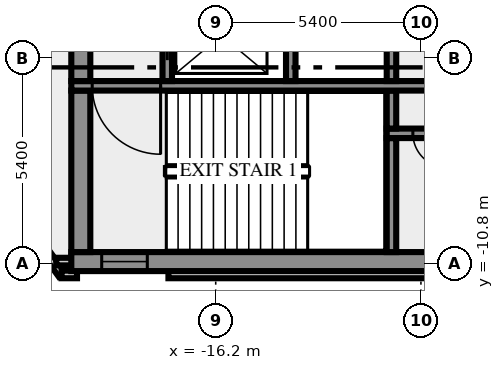
"""IFC4 building model, lengths in metres.
Left out: names, types, materials, properties, quantities, classifications, styles, units other than length and angle.
Written with IfcOpenShell. Run it as: python <this file> out.ifc"""

import sys

from ifc_helpers import new_model, si_unit, direction, frame, frame_2d, origin, place, context, subcontext, project, spatial, rectangle, extrude, element, fill, save


model = new_model("IFC4")
c1 = context("Model", 3, precision=1e-05, world=origin(), true_north=direction((0.0, 1.0)))
c2 = subcontext(c1, "Body", "Model", "MODEL_VIEW")
j1 = project(units=[si_unit("LENGTHUNIT", "METRE"), si_unit("PLANEANGLEUNIT", "RADIAN")], contexts=[c1])
p1 = place(None, origin())
s1 = spatial("IfcSite", under=j1, at=p1, CompositionType="ELEMENT")
p2 = place(p1, origin())
s2 = spatial("IfcBuilding", under=s1, at=p2, CompositionType="ELEMENT")
p3 = place(p2, frame((0.0, 0.0, 148.0)))
s3 = spatial("IfcBuildingStorey", under=s2, at=p3, CompositionType="ELEMENT", Elevation=148.0)
p4 = place(p3, frame((-21.833, -8.909, 0.0), z_axis=(0.0, 0.0, 1.0), x_axis=(0.587766567315, -0.809030569476, 0.0)))
e1 = element("IfcWall", 1, at=p4, inside=s3, PredefinedType="SOLIDWALL", context=c2, shape_type="SweptSolid", body=[
    extrude(rectangle(XDim=2.688, YDim=0.2, at=frame_2d((1.344, 0.0))), origin(), (0.0, 0.0, 1.0), 3.65),
])
p5 = place(p3, frame((-20.256, -11.088, 0.0), z_axis=(0.0, 0.0, 1.0), x_axis=(1.0, 0.0, 0.0)))
e2 = element("IfcWall", 2, at=p5, inside=s3, PredefinedType="SOLIDWALL", context=c2, shape_type="SweptSolid", body=[
    extrude(rectangle(XDim=0.406, YDim=0.2, at=frame_2d((0.203, 0.0))), origin(), (0.0, 0.0, 1.0), 3.65),
])
p6 = place(p3, frame((-17.444, -11.088, 0.0), z_axis=(0.0, 0.0, 1.0), x_axis=(1.0, 0.0, 0.0)))
e3 = element("IfcWall", 3, at=p6, inside=s3, PredefinedType="SOLIDWALL", context=c2, shape_type="SweptSolid", body=[
    extrude(rectangle(XDim=34.888, YDim=0.2, at=frame_2d((17.444, 0.0))), origin(), (0.0, 0.0, 1.0), 3.65),
])
p7 = place(p3, frame((-19.98, -10.75, 0.0), z_axis=(0.0, 0.0, 1.0), x_axis=(-1.0, 0.0, 0.0)))
e4 = element("IfcWall", 4, at=p7, inside=s3, PredefinedType="SOLIDWALL", context=c2, shape_type="SweptSolid", body=[
    extrude(rectangle(XDim=0.417, YDim=0.2, at=frame_2d((0.208, 0.0))), origin(), (0.0, 0.0, 1.0), 3.65),
])
p8 = place(p3, frame((-20.0, -10.75, 0.0), z_axis=(0.0, 0.0, 1.0), x_axis=(1.0, 0.0, 0.0)))
e5 = element("IfcWall", 5, at=p8, inside=s3, PredefinedType="SHEAR", context=c2, shape_type="SweptSolid", body=[
    extrude(rectangle(XDim=40.0, YDim=0.5, at=frame_2d((20.0, 0.0))), origin(), (0.0, 0.0, 1.0), 3.65),
])
p9 = place(p8, frame((0.8, 0.0, 1.0)))
e6 = element("IfcOpeningElement", 6, at=p9, cuts=e5, PredefinedType="OPENING", context=c2, shape_type="SweptSolid", body=[
    extrude(rectangle(XDim=1.2, YDim=1.2, at=frame_2d((0.6, 0.6))), frame((0.0, 0.26, 0.0), z_axis=(0.0, -1.0, 0.0), x_axis=(1.0, 0.0, 0.0)), (0.0, 0.0, 1.0), 0.52),
])
p10 = place(p8, frame((38.0, 0.0, 1.0)))
e7 = element("IfcOpeningElement", 7, at=p10, cuts=e5, PredefinedType="OPENING", context=c2, shape_type="SweptSolid", body=[
    extrude(rectangle(XDim=1.2, YDim=1.2, at=frame_2d((0.6, 0.6))), frame((0.0, 0.26, 0.0), z_axis=(0.0, -1.0, 0.0), x_axis=(1.0, 0.0, 0.0)), (0.0, 0.0, 1.0), 0.52),
])
p11 = place(p3, frame((-19.75, -10.5, 0.0), z_axis=(0.0, 0.0, 1.0), x_axis=(0.0, 1.0, 0.0)))
e8 = element("IfcWall", 8, at=p11, inside=s3, PredefinedType="SHEAR", context=c2, shape_type="SweptSolid", body=[
    extrude(rectangle(XDim=4.25, YDim=0.5, at=frame_2d((2.125, 0.0))), origin(), (0.0, 0.0, 1.0), 3.65),
])
p12 = place(p3, frame((-11.575, -10.5, 0.0), z_axis=(0.0, 0.0, 1.0), x_axis=(0.0, 1.0, 0.0)))
e9 = element("IfcWall", 9, at=p12, inside=s3, PredefinedType="SHEAR", context=c2, shape_type="SweptSolid", body=[
    extrude(rectangle(XDim=3.0, YDim=0.25, at=frame_2d((1.5, 0.0))), origin(), (0.0, 0.0, 1.0), 3.65),
])
p13 = place(p3, frame((11.7, -7.375, 0.0), z_axis=(0.0, 0.0, 1.0), x_axis=(-1.0, 0.0, 0.0)))
e10 = element("IfcWall", 10, at=p13, inside=s3, PredefinedType="SHEAR", context=c2, shape_type="SweptSolid", body=[
    extrude(rectangle(XDim=23.4, YDim=0.25, at=frame_2d((11.7, 0.0))), origin(), (0.0, 0.0, 1.0), 3.65),
])
p14 = place(p13, frame((21.812, 0.0, 0.0)))
e11 = element("IfcOpeningElement", 11, at=p14, cuts=e10, PredefinedType="OPENING", context=c2, shape_type="SweptSolid", body=[
    extrude(rectangle(XDim=0.9, YDim=2.1, at=frame_2d((0.45, 1.05))), frame((0.0, 0.135, 0.0), z_axis=(0.0, -1.0, 0.0), x_axis=(1.0, 0.0, 0.0)), (0.0, 0.0, 1.0), 0.27),
])
p15 = place(p13, frame((19.55, 0.0, 0.0)))
e12 = element("IfcOpeningElement", 12, at=p15, cuts=e10, PredefinedType="OPENING", context=c2, shape_type="SweptSolid", body=[
    extrude(rectangle(XDim=0.9, YDim=2.1, at=frame_2d((0.45, 1.05))), frame((0.0, 0.135, 0.0), z_axis=(0.0, -1.0, 0.0), x_axis=(1.0, 0.0, 0.0)), (0.0, 0.0, 1.0), 0.27),
])
p16 = place(p13, frame((16.787, 0.0, 0.0)))
e13 = element("IfcOpeningElement", 13, at=p16, cuts=e10, PredefinedType="OPENING", context=c2, shape_type="SweptSolid", body=[
    extrude(rectangle(XDim=0.9, YDim=2.1, at=frame_2d((0.45, 1.05))), frame((0.0, 0.135, 0.0), z_axis=(0.0, -1.0, 0.0), x_axis=(1.0, 0.0, 0.0)), (0.0, 0.0, 1.0), 0.27),
])
p17 = place(p13, frame((14.55, 0.0, 0.0)))
e14 = element("IfcOpeningElement", 14, at=p17, cuts=e10, PredefinedType="OPENING", context=c2, shape_type="SweptSolid", body=[
    extrude(rectangle(XDim=0.8, YDim=2.1, at=frame_2d((0.4, 1.05))), frame((0.0, 0.135, 0.0), z_axis=(0.0, -1.0, 0.0), x_axis=(1.0, 0.0, 0.0)), (0.0, 0.0, 1.0), 0.27),
])
p18 = place(p13, frame((12.8, 0.0, 0.0)))
e15 = element("IfcOpeningElement", 15, at=p18, cuts=e10, PredefinedType="OPENING", context=c2, shape_type="SweptSolid", body=[
    extrude(rectangle(XDim=0.9, YDim=2.1, at=frame_2d((0.45, 1.05))), frame((0.0, 0.135, 0.0), z_axis=(0.0, -1.0, 0.0), x_axis=(1.0, 0.0, 0.0)), (0.0, 0.0, 1.0), 0.27),
])
p19 = place(p13, frame((10.7, 0.0, 0.0)))
e16 = element("IfcOpeningElement", 16, at=p19, cuts=e10, PredefinedType="OPENING", context=c2, shape_type="SweptSolid", body=[
    extrude(rectangle(XDim=0.9, YDim=2.1, at=frame_2d((0.45, 1.05))), frame((0.0, 0.135, 0.0), z_axis=(0.0, -1.0, 0.0), x_axis=(1.0, 0.0, 0.0)), (0.0, 0.0, 1.0), 0.27),
])
p20 = place(p13, frame((8.35, 0.0, 0.0)))
e17 = element("IfcOpeningElement", 17, at=p20, cuts=e10, PredefinedType="OPENING", context=c2, shape_type="SweptSolid", body=[
    extrude(rectangle(XDim=1.1, YDim=2.1, at=frame_2d((0.55, 1.05))), frame((0.0, 0.135, 0.0), z_axis=(0.0, -1.0, 0.0), x_axis=(1.0, 0.0, 0.0)), (0.0, 0.0, 1.0), 0.27),
])
p21 = place(p13, frame((5.85, 0.0, 0.0)))
e18 = element("IfcOpeningElement", 18, at=p21, cuts=e10, PredefinedType="OPENING", context=c2, shape_type="SweptSolid", body=[
    extrude(rectangle(XDim=1.1, YDim=2.1, at=frame_2d((0.55, 1.05))), frame((0.0, 0.135, 0.0), z_axis=(0.0, -1.0, 0.0), x_axis=(1.0, 0.0, 0.0)), (0.0, 0.0, 1.0), 0.27),
])
p22 = place(p13, frame((3.35, 0.0, 0.0)))
e19 = element("IfcOpeningElement", 19, at=p22, cuts=e10, PredefinedType="OPENING", context=c2, shape_type="SweptSolid", body=[
    extrude(rectangle(XDim=1.1, YDim=2.1, at=frame_2d((0.55, 1.05))), frame((0.0, 0.135, 0.0), z_axis=(0.0, -1.0, 0.0), x_axis=(1.0, 0.0, 0.0)), (0.0, 0.0, 1.0), 0.27),
])
p23 = place(p13, frame((0.85, 0.0, 0.0)))
e20 = element("IfcOpeningElement", 20, at=p23, cuts=e10, PredefinedType="OPENING", context=c2, shape_type="SweptSolid", body=[
    extrude(rectangle(XDim=1.1, YDim=2.1, at=frame_2d((0.55, 1.05))), frame((0.0, 0.135, 0.0), z_axis=(0.0, -1.0, 0.0), x_axis=(1.0, 0.0, 0.0)), (0.0, 0.0, 1.0), 0.27),
])
p24 = place(p3, frame((-11.575, -7.25, 0.0), z_axis=(0.0, 0.0, 1.0), x_axis=(0.0, 1.0, 0.0)))
e21 = element("IfcWall", 21, at=p24, inside=s3, PredefinedType="SHEAR", context=c2, shape_type="SweptSolid", body=[
    extrude(rectangle(XDim=1.0, YDim=0.25, at=frame_2d((0.5, 0.0))), origin(), (0.0, 0.0, 1.0), 3.65),
])
p25 = place(p3, frame((-9.8, -6.125, 0.0), z_axis=(0.0, 0.0, 1.0), x_axis=(-1.0, 0.0, 0.0)))
e22 = element("IfcWall", 22, at=p25, inside=s3, PredefinedType="SHEAR", context=c2, shape_type="SweptSolid", body=[
    extrude(rectangle(XDim=10.2, YDim=0.25, at=frame_2d((5.1, 0.0))), origin(), (0.0, 0.0, 1.0), 3.65),
])
p26 = place(p25, frame((7.85, 0.0, 0.0)))
e23 = element("IfcOpeningElement", 23, at=p26, cuts=e22, PredefinedType="OPENING", context=c2, shape_type="SweptSolid", body=[
    extrude(rectangle(XDim=1.8, YDim=2.1, at=frame_2d((0.9, 1.05))), frame((0.0, 0.135, 0.0), z_axis=(0.0, -1.0, 0.0), x_axis=(1.0, 0.0, 0.0)), (0.0, 0.0, 1.0), 0.27),
])
p27 = place(p3, frame((-19.75, -6.0, 0.0), z_axis=(0.0, 0.0, 1.0), x_axis=(0.0, 1.0, 0.0)))
e24 = element("IfcWall", 24, at=p27, inside=s3, PredefinedType="SHEAR", context=c2, shape_type="SweptSolid", body=[
    extrude(rectangle(XDim=4.3, YDim=0.5, at=frame_2d((2.15, 0.0))), origin(), (0.0, 0.0, 1.0), 3.65),
])
p28 = place(p3, frame((-17.475, -6.0, 0.0), z_axis=(0.0, 0.0, 1.0), x_axis=(0.0, 1.0, 0.0)))
e25 = element("IfcWall", 25, at=p28, inside=s3, PredefinedType="SHEAR", context=c2, shape_type="SweptSolid", body=[
    extrude(rectangle(XDim=4.3, YDim=0.25, at=frame_2d((2.15, 0.0))), origin(), (0.0, 0.0, 1.0), 3.65),
])
p29 = place(p28, frame((0.55, 0.0, 0.0)))
e26 = element("IfcOpeningElement", 26, at=p29, cuts=e25, PredefinedType="OPENING", context=c2, shape_type="SweptSolid", body=[
    extrude(rectangle(XDim=1.3, YDim=2.1, at=frame_2d((0.65, 1.05))), frame((0.0, 0.135, 0.0), z_axis=(0.0, -1.0, 0.0), x_axis=(1.0, 0.0, 0.0)), (0.0, 0.0, 1.0), 0.27),
])
p30 = place(p3, frame((-14.225, -6.0, 0.0), z_axis=(0.0, 0.0, 1.0), x_axis=(0.0, 1.0, 0.0)))
e27 = element("IfcWall", 27, at=p30, inside=s3, PredefinedType="SHEAR", context=c2, shape_type="SweptSolid", body=[
    extrude(rectangle(XDim=4.3, YDim=0.25, at=frame_2d((2.15, 0.0))), origin(), (0.0, 0.0, 1.0), 3.65),
])
p31 = place(p3, frame((-11.575, -6.0, 0.0), z_axis=(0.0, 0.0, 1.0), x_axis=(0.0, 1.0, 0.0)))
e28 = element("IfcWall", 28, at=p31, inside=s3, PredefinedType="SHEAR", context=c2, shape_type="SweptSolid", body=[
    extrude(rectangle(XDim=1.75, YDim=0.25, at=frame_2d((0.875, 0.0))), origin(), (0.0, 0.0, 1.0), 3.65),
])
p32 = place(p9, origin())
e29 = element("IfcWindow", 29, at=p32, inside=s3, PartitioningType="SINGLE_PANEL", PredefinedType="WINDOW", context=c2, shape_type="SweptSolid", body=[
    extrude(rectangle(XDim=1.2, YDim=1.2, at=frame_2d((0.6, 0.6))), frame((0.0, 0.03, 0.0), z_axis=(0.0, -1.0, 0.0), x_axis=(1.0, 0.0, 0.0)), (0.0, 0.0, 1.0), 0.06),
])
fill(e6, e29)
p33 = place(p14, origin())
e30 = element("IfcDoor", 30, at=p33, inside=s3, OperationType="SINGLE_SWING_RIGHT", PredefinedType="DOOR", context=c2, shape_type="SweptSolid", body=[
    extrude(rectangle(XDim=0.9, YDim=2.1, at=frame_2d((0.45, 1.05))), frame((0.0, 0.025, 0.0), z_axis=(0.0, -1.0, 0.0), x_axis=(1.0, 0.0, 0.0)), (0.0, 0.0, 1.0), 0.05),
])
fill(e11, e30)
p34 = place(p26, origin())
e31 = element("IfcDoor", 31, at=p34, inside=s3, OperationType="DOUBLE_DOOR_SINGLE_SWING", PredefinedType="DOOR", context=c2, shape_type="SweptSolid", body=[
    extrude(rectangle(XDim=1.8, YDim=2.1, at=frame_2d((0.9, 1.05))), frame((0.0, 0.025, 0.0), z_axis=(0.0, -1.0, 0.0), x_axis=(1.0, 0.0, 0.0)), (0.0, 0.0, 1.0), 0.05),
])
fill(e23, e31)
p35 = place(p29, origin())
e32 = element("IfcDoor", 32, at=p35, inside=s3, OperationType="DOUBLE_DOOR_SLIDING", PredefinedType="DOOR", context=c2, shape_type="SweptSolid", body=[
    extrude(rectangle(XDim=1.3, YDim=2.1, at=frame_2d((0.65, 1.05))), frame((0.0, 0.025, 0.0), z_axis=(0.0, -1.0, 0.0), x_axis=(1.0, 0.0, 0.0)), (0.0, 0.0, 1.0), 0.05),
])
fill(e26, e32)
save(model, sys.argv[1])
